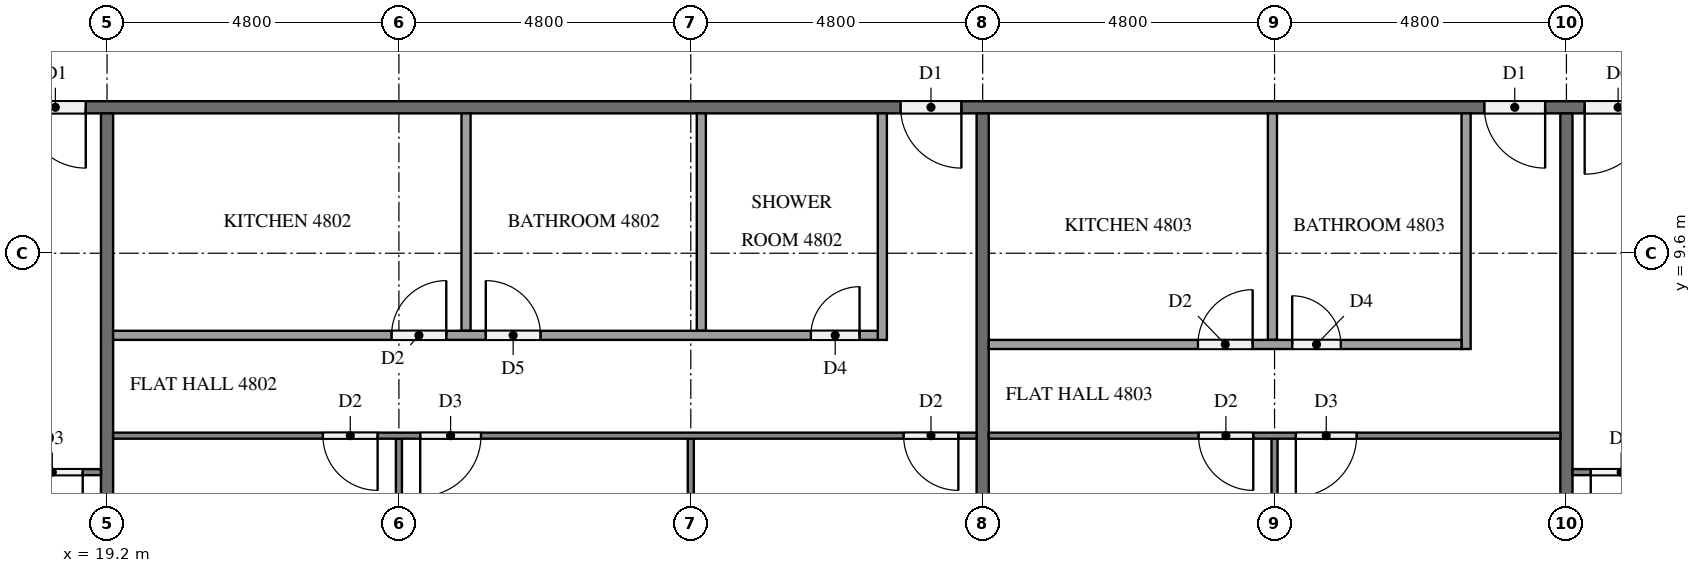
"""IFC4 building model, lengths in metres.
Left out: names, types, materials, properties, quantities, classifications, styles, units other than length and angle.
Written with IfcOpenShell. Run it as: python <this file> out.ifc"""

import sys

from ifc_helpers import new_model, si_unit, direction, frame, frame_2d, origin, place, context, subcontext, project, spatial, rectangle, extrude, element, fill, save


model = new_model("IFC4")
c1 = context("Model", 3, precision=1e-05, world=origin(), true_north=direction((0.0, 1.0)))
c2 = subcontext(c1, "Body", "Model", "MODEL_VIEW")
j1 = project(units=[si_unit("LENGTHUNIT", "METRE"), si_unit("PLANEANGLEUNIT", "RADIAN")], contexts=[c1])
p1 = place(None, origin())
s1 = spatial("IfcSite", under=j1, at=p1, CompositionType="ELEMENT")
p2 = place(p1, origin())
s2 = spatial("IfcBuilding", under=s1, at=p2, CompositionType="ELEMENT")
p3 = place(p2, frame((0.0, 0.0, 185.9)))
s3 = spatial("IfcBuildingStorey", under=s2, at=p3, CompositionType="ELEMENT", Elevation=185.9)
p4 = place(p3, frame((50.5, 12.0, 0.0), z_axis=(0.0, 0.0, 1.0), x_axis=(-1.0, 0.0, 0.0)))
e1 = element("IfcWall", 1, at=p4, inside=s3, PredefinedType="PARTITIONING", context=c2, shape_type="SweptSolid", body=[
    extrude(rectangle(XDim=38.6, YDim=0.2, at=frame_2d((19.3, 0.0))), origin(), (0.0, 0.0, 1.0), 3.2),
])
p5 = place(p4, frame((31.65, 0.0, 0.0)))
e2 = element("IfcOpeningElement", 2, at=p5, cuts=e1, PredefinedType="OPENING", context=c2, shape_type="SweptSolid", body=[
    extrude(rectangle(XDim=1.0, YDim=2.1, at=frame_2d((0.5, 1.05))), frame((0.0, 0.11, 0.0), z_axis=(0.0, -1.0, 0.0), x_axis=(1.0, 0.0, 0.0)), (0.0, 0.0, 1.0), 0.22),
])
p6 = place(p4, frame((17.25, 0.0, 0.0)))
e3 = element("IfcOpeningElement", 3, at=p6, cuts=e1, PredefinedType="OPENING", context=c2, shape_type="SweptSolid", body=[
    extrude(rectangle(XDim=1.0, YDim=2.1, at=frame_2d((0.5, 1.05))), frame((0.0, 0.11, 0.0), z_axis=(0.0, -1.0, 0.0), x_axis=(1.0, 0.0, 0.0)), (0.0, 0.0, 1.0), 0.22),
])
p7 = place(p4, frame((7.65, 0.0, 0.0)))
e4 = element("IfcOpeningElement", 4, at=p7, cuts=e1, PredefinedType="OPENING", context=c2, shape_type="SweptSolid", body=[
    extrude(rectangle(XDim=1.0, YDim=2.1, at=frame_2d((0.5, 1.05))), frame((0.0, 0.11, 0.0), z_axis=(0.0, -1.0, 0.0), x_axis=(1.0, 0.0, 0.0)), (0.0, 0.0, 1.0), 0.22),
])
p8 = place(p4, frame((5.9, 0.0, 0.0)))
e5 = element("IfcOpeningElement", 5, at=p8, cuts=e1, PredefinedType="OPENING", context=c2, shape_type="SweptSolid", body=[
    extrude(rectangle(XDim=1.1, YDim=2.1, at=frame_2d((0.55, 1.05))), frame((0.0, 0.11, 0.0), z_axis=(0.0, -1.0, 0.0), x_axis=(1.0, 0.0, 0.0)), (0.0, 0.0, 1.0), 0.22),
])
p9 = place(p3, frame((19.2, 11.9, 0.0), z_axis=(0.0, 0.0, 1.0), x_axis=(0.0, -1.0, 0.0)))
e6 = element("IfcWall", 6, at=p9, inside=s3, PredefinedType="PARTITIONING", context=c2, shape_type="SweptSolid", body=[
    extrude(rectangle(XDim=11.575, YDim=0.2, at=frame_2d((5.788, 0.0))), origin(), (0.0, 0.0, 1.0), 3.2),
])
for number, where, z_axis, x_axis in (
    (7, (33.6, 11.9, 0.0), (0.0, 0.0, 1.0), (0.0, -1.0, 0.0)),
    (8, (43.2, 11.9, 0.0), (0.0, 0.0, 1.0), (0.0, -1.0, 0.0)),
):
    element("IfcWall", number, at=place(p3, frame(where, z_axis=z_axis, x_axis=x_axis)), inside=s3, PredefinedType="PARTITIONING", context=c2, shape_type="SweptSolid", body=[
        extrude(rectangle(XDim=11.8, YDim=0.2, at=frame_2d((5.9, 0.0))), origin(), (0.0, 0.0, 1.0), 3.2),
    ])
p10 = place(p3, frame((19.1, 6.0, 0.0), z_axis=(0.0, 0.0, 1.0), x_axis=(-1.0, 0.0, 0.0)))
e9 = element("IfcWall", 9, at=p10, inside=s3, PredefinedType="PARTITIONING", context=c2, shape_type="SweptSolid", body=[
    extrude(rectangle(XDim=14.2, YDim=0.1, at=frame_2d((7.1, 0.0))), origin(), (0.0, 0.0, 1.0), 3.2),
])
p11 = place(p10, frame((0.3, 0.0, 0.0)))
e10 = element("IfcOpeningElement", 10, at=p11, cuts=e9, PredefinedType="OPENING", context=c2, shape_type="SweptSolid", body=[
    extrude(rectangle(XDim=1.0, YDim=2.1, at=frame_2d((0.5, 1.05))), frame((0.0, 0.06, 0.0), z_axis=(0.0, -1.0, 0.0), x_axis=(1.0, 0.0, 0.0)), (0.0, 0.0, 1.0), 0.12),
])
p12 = place(p10, frame((8.25, 0.0, 0.0)))
e11 = element("IfcOpeningElement", 11, at=p12, cuts=e9, PredefinedType="OPENING", context=c2, shape_type="SweptSolid", body=[
    extrude(rectangle(XDim=0.9, YDim=2.1, at=frame_2d((0.45, 1.05))), frame((0.0, 0.06, 0.0), z_axis=(0.0, -1.0, 0.0), x_axis=(1.0, 0.0, 0.0)), (0.0, 0.0, 1.0), 0.12),
])
p13 = place(p10, frame((9.85, 0.0, 0.0)))
e12 = element("IfcOpeningElement", 12, at=p13, cuts=e9, PredefinedType="OPENING", context=c2, shape_type="SweptSolid", body=[
    extrude(rectangle(XDim=0.9, YDim=2.1, at=frame_2d((0.45, 1.05))), frame((0.0, 0.06, 0.0), z_axis=(0.0, -1.0, 0.0), x_axis=(1.0, 0.0, 0.0)), (0.0, 0.0, 1.0), 0.12),
])
p14 = place(p3, frame((28.8, 6.55, 0.0), z_axis=(0.0, 0.0, 1.0), x_axis=(0.0, -1.0, 0.0)))
e13 = element("IfcWall", 13, at=p14, inside=s3, PredefinedType="PARTITIONING", context=c2, shape_type="SweptSolid", body=[
    extrude(rectangle(XDim=6.225, YDim=0.1, at=frame_2d((3.113, 0.0))), origin(), (0.0, 0.0, 1.0), 3.2),
])
p15 = place(p3, frame((24.0, 6.55, 0.0), z_axis=(0.0, 0.0, 1.0), x_axis=(0.0, -1.0, 0.0)))
e14 = element("IfcWall", 14, at=p15, inside=s3, PredefinedType="PARTITIONING", context=c2, shape_type="SweptSolid", body=[
    extrude(rectangle(XDim=6.45, YDim=0.1, at=frame_2d((3.225, 0.0))), origin(), (0.0, 0.0, 1.0), 3.2),
])
p16 = place(p3, frame((33.5, 6.6, 0.0), z_axis=(0.0, 0.0, 1.0), x_axis=(-1.0, 0.0, 0.0)))
e15 = element("IfcWall", 15, at=p16, inside=s3, PredefinedType="PARTITIONING", context=c2, shape_type="SweptSolid", body=[
    extrude(rectangle(XDim=14.2, YDim=0.1, at=frame_2d((7.1, 0.0))), origin(), (0.0, 0.0, 1.0), 3.2),
])
p17 = place(p16, frame((0.3, 0.0, 0.0)))
e16 = element("IfcOpeningElement", 16, at=p17, cuts=e15, PredefinedType="OPENING", context=c2, shape_type="SweptSolid", body=[
    extrude(rectangle(XDim=0.9, YDim=2.1, at=frame_2d((0.45, 1.05))), frame((0.0, 0.06, 0.0), z_axis=(0.0, -1.0, 0.0), x_axis=(1.0, 0.0, 0.0)), (0.0, 0.0, 1.0), 0.12),
])
p18 = place(p16, frame((8.15, 0.0, 0.0)))
e17 = element("IfcOpeningElement", 17, at=p18, cuts=e15, PredefinedType="OPENING", context=c2, shape_type="SweptSolid", body=[
    extrude(rectangle(XDim=1.0, YDim=2.1, at=frame_2d((0.5, 1.05))), frame((0.0, 0.06, 0.0), z_axis=(0.0, -1.0, 0.0), x_axis=(1.0, 0.0, 0.0)), (0.0, 0.0, 1.0), 0.12),
])
p19 = place(p16, frame((9.85, 0.0, 0.0)))
e18 = element("IfcOpeningElement", 18, at=p19, cuts=e15, PredefinedType="OPENING", context=c2, shape_type="SweptSolid", body=[
    extrude(rectangle(XDim=0.9, YDim=2.1, at=frame_2d((0.45, 1.05))), frame((0.0, 0.06, 0.0), z_axis=(0.0, -1.0, 0.0), x_axis=(1.0, 0.0, 0.0)), (0.0, 0.0, 1.0), 0.12),
])
for number, where, z_axis, x_axis in (
    (19, (28.973, 11.9, 0.0), (0.0, 0.0, 1.0), (0.0, -1.0, 0.0)),
    (20, (25.104, 11.9, 0.0), (0.0, 0.0, 1.0), (0.0, -1.0, 0.0)),
):
    element("IfcWall", number, at=place(p3, frame(where, z_axis=z_axis, x_axis=x_axis)), inside=s3, PredefinedType="PARTITIONING", context=c2, shape_type="SweptSolid", body=[
        extrude(rectangle(XDim=3.575, YDim=0.15, at=frame_2d((1.788, 0.0))), origin(), (0.0, 0.0, 1.0), 3.2),
    ])
p20 = place(p3, frame((31.95, 11.9, 0.0), z_axis=(0.0, 0.0, 1.0), x_axis=(0.0, -1.0, 0.0)))
e21 = element("IfcWall", 21, at=p20, inside=s3, PredefinedType="PARTITIONING", context=c2, shape_type="SweptSolid", body=[
    extrude(rectangle(XDim=3.725, YDim=0.15, at=frame_2d((1.862, 0.0))), origin(), (0.0, 0.0, 1.0), 3.2),
])
p21 = place(p3, frame((19.3, 8.25, 0.0), z_axis=(0.0, 0.0, 1.0), x_axis=(1.0, 0.0, 0.0)))
e22 = element("IfcWall", 22, at=p21, inside=s3, PredefinedType="PARTITIONING", context=c2, shape_type="SweptSolid", body=[
    extrude(rectangle(XDim=12.575, YDim=0.15, at=frame_2d((6.288, 0.0))), origin(), (0.0, 0.0, 1.0), 3.2),
])
p22 = place(p21, frame((11.475, 0.0, 0.0)))
e23 = element("IfcOpeningElement", 23, at=p22, cuts=e22, PredefinedType="OPENING", context=c2, shape_type="SweptSolid", body=[
    extrude(rectangle(XDim=0.8, YDim=2.1, at=frame_2d((0.4, 1.05))), frame((0.0, 0.085, 0.0), z_axis=(0.0, -1.0, 0.0), x_axis=(1.0, 0.0, 0.0)), (0.0, 0.0, 1.0), 0.17),
])
p23 = place(p21, frame((6.129, 0.0, 0.0)))
e24 = element("IfcOpeningElement", 24, at=p23, cuts=e22, PredefinedType="OPENING", context=c2, shape_type="SweptSolid", body=[
    extrude(rectangle(XDim=0.9, YDim=2.1, at=frame_2d((0.45, 1.05))), frame((0.0, 0.085, 0.0), z_axis=(0.0, -1.0, 0.0), x_axis=(1.0, 0.0, 0.0)), (0.0, 0.0, 1.0), 0.17),
])
p24 = place(p21, frame((4.579, 0.0, 0.0)))
e25 = element("IfcOpeningElement", 25, at=p24, cuts=e22, PredefinedType="OPENING", context=c2, shape_type="SweptSolid", body=[
    extrude(rectangle(XDim=0.9, YDim=2.1, at=frame_2d((0.45, 1.05))), frame((0.0, 0.085, 0.0), z_axis=(0.0, -1.0, 0.0), x_axis=(1.0, 0.0, 0.0)), (0.0, 0.0, 1.0), 0.17),
])
p25 = place(p3, frame((38.4, 6.55, 0.0), z_axis=(0.0, 0.0, 1.0), x_axis=(0.0, -1.0, 0.0)))
e26 = element("IfcWall", 26, at=p25, inside=s3, PredefinedType="PARTITIONING", context=c2, shape_type="SweptSolid", body=[
    extrude(rectangle(XDim=6.225, YDim=0.1, at=frame_2d((3.113, 0.0))), origin(), (0.0, 0.0, 1.0), 3.2),
])
p26 = place(p3, frame((43.1, 6.6, 0.0), z_axis=(0.0, 0.0, 1.0), x_axis=(-1.0, 0.0, 0.0)))
e27 = element("IfcWall", 27, at=p26, inside=s3, PredefinedType="PARTITIONING", context=c2, shape_type="SweptSolid", body=[
    extrude(rectangle(XDim=9.4, YDim=0.1, at=frame_2d((4.7, 0.0))), origin(), (0.0, 0.0, 1.0), 3.2),
])
p27 = place(p26, frame((3.35, 0.0, 0.0)))
e28 = element("IfcOpeningElement", 28, at=p27, cuts=e27, PredefinedType="OPENING", context=c2, shape_type="SweptSolid", body=[
    extrude(rectangle(XDim=1.0, YDim=2.1, at=frame_2d((0.5, 1.05))), frame((0.0, 0.06, 0.0), z_axis=(0.0, -1.0, 0.0), x_axis=(1.0, 0.0, 0.0)), (0.0, 0.0, 1.0), 0.12),
])
p28 = place(p26, frame((5.05, 0.0, 0.0)))
e29 = element("IfcOpeningElement", 29, at=p28, cuts=e27, PredefinedType="OPENING", context=c2, shape_type="SweptSolid", body=[
    extrude(rectangle(XDim=0.9, YDim=2.1, at=frame_2d((0.45, 1.05))), frame((0.0, 0.06, 0.0), z_axis=(0.0, -1.0, 0.0), x_axis=(1.0, 0.0, 0.0)), (0.0, 0.0, 1.0), 0.12),
])
p29 = place(p3, frame((38.365, 11.9, 0.0), z_axis=(0.0, 0.0, 1.0), x_axis=(0.0, -1.0, 0.0)))
e30 = element("IfcWall", 30, at=p29, inside=s3, PredefinedType="PARTITIONING", context=c2, shape_type="SweptSolid", body=[
    extrude(rectangle(XDim=3.725, YDim=0.15, at=frame_2d((1.862, 0.0))), origin(), (0.0, 0.0, 1.0), 3.2),
])
p30 = place(p3, frame((41.55, 11.9, 0.0), z_axis=(0.0, 0.0, 1.0), x_axis=(0.0, -1.0, 0.0)))
e31 = element("IfcWall", 31, at=p30, inside=s3, PredefinedType="PARTITIONING", context=c2, shape_type="SweptSolid", body=[
    extrude(rectangle(XDim=3.875, YDim=0.15, at=frame_2d((1.938, 0.0))), origin(), (0.0, 0.0, 1.0), 3.2),
])
p31 = place(p3, frame((33.7, 8.1, 0.0), z_axis=(0.0, 0.0, 1.0), x_axis=(1.0, 0.0, 0.0)))
e32 = element("IfcWall", 32, at=p31, inside=s3, PredefinedType="PARTITIONING", context=c2, shape_type="SweptSolid", body=[
    extrude(rectangle(XDim=7.775, YDim=0.15, at=frame_2d((3.888, 0.0))), origin(), (0.0, 0.0, 1.0), 3.2),
])
p32 = place(p31, frame((4.99, 0.0, 0.0)))
e33 = element("IfcOpeningElement", 33, at=p32, cuts=e32, PredefinedType="OPENING", context=c2, shape_type="SweptSolid", body=[
    extrude(rectangle(XDim=0.8, YDim=2.1, at=frame_2d((0.4, 1.05))), frame((0.0, 0.085, 0.0), z_axis=(0.0, -1.0, 0.0), x_axis=(1.0, 0.0, 0.0)), (0.0, 0.0, 1.0), 0.17),
])
p33 = place(p31, frame((3.44, 0.0, 0.0)))
e34 = element("IfcOpeningElement", 34, at=p33, cuts=e32, PredefinedType="OPENING", context=c2, shape_type="SweptSolid", body=[
    extrude(rectangle(XDim=0.9, YDim=2.1, at=frame_2d((0.45, 1.05))), frame((0.0, 0.085, 0.0), z_axis=(0.0, -1.0, 0.0), x_axis=(1.0, 0.0, 0.0)), (0.0, 0.0, 1.0), 0.17),
])
p34 = place(p3, frame((62.3, 6.0, 0.0), z_axis=(0.0, 0.0, 1.0), x_axis=(-1.0, 0.0, 0.0)))
e35 = element("IfcWall", 35, at=p34, inside=s3, PredefinedType="PARTITIONING", context=c2, shape_type="SweptSolid", body=[
    extrude(rectangle(XDim=19.0, YDim=0.1, at=frame_2d((9.5, 0.0))), origin(), (0.0, 0.0, 1.0), 3.2),
])
p35 = place(p34, frame((17.7, 0.0, 0.0)))
e36 = element("IfcOpeningElement", 36, at=p35, cuts=e35, PredefinedType="OPENING", context=c2, shape_type="SweptSolid", body=[
    extrude(rectangle(XDim=1.0, YDim=2.1, at=frame_2d((0.5, 1.05))), frame((0.0, 0.06, 0.0), z_axis=(0.0, -1.0, 0.0), x_axis=(1.0, 0.0, 0.0)), (0.0, 0.0, 1.0), 0.12),
])
p36 = place(p34, frame((9.85, 0.0, 0.0)))
e37 = element("IfcOpeningElement", 37, at=p36, cuts=e35, PredefinedType="OPENING", context=c2, shape_type="SweptSolid", body=[
    extrude(rectangle(XDim=0.9, YDim=2.1, at=frame_2d((0.45, 1.05))), frame((0.0, 0.06, 0.0), z_axis=(0.0, -1.0, 0.0), x_axis=(1.0, 0.0, 0.0)), (0.0, 0.0, 1.0), 0.12),
])
p37 = place(p34, frame((8.25, 0.0, 0.0)))
e38 = element("IfcOpeningElement", 38, at=p37, cuts=e35, PredefinedType="OPENING", context=c2, shape_type="SweptSolid", body=[
    extrude(rectangle(XDim=0.9, YDim=2.1, at=frame_2d((0.45, 1.05))), frame((0.0, 0.06, 0.0), z_axis=(0.0, -1.0, 0.0), x_axis=(1.0, 0.0, 0.0)), (0.0, 0.0, 1.0), 0.12),
])
p38 = place(p34, frame((0.4, 0.0, 0.0)))
e39 = element("IfcOpeningElement", 39, at=p38, cuts=e35, PredefinedType="OPENING", context=c2, shape_type="SweptSolid", body=[
    extrude(rectangle(XDim=0.9, YDim=2.1, at=frame_2d((0.45, 1.05))), frame((0.0, 0.06, 0.0), z_axis=(0.0, -1.0, 0.0), x_axis=(1.0, 0.0, 0.0)), (0.0, 0.0, 1.0), 0.12),
])
p39 = place(p5, origin())
e40 = element("IfcDoor", 40, at=p39, inside=s3, OperationType="SINGLE_SWING_LEFT", PredefinedType="DOOR", context=c2, shape_type="SweptSolid", body=[
    extrude(rectangle(XDim=1.0, YDim=2.1, at=frame_2d((0.5, 1.05))), frame((0.0, 0.025, 0.0), z_axis=(0.0, -1.0, 0.0), x_axis=(1.0, 0.0, 0.0)), (0.0, 0.0, 1.0), 0.05),
])
fill(e2, e40)
p40 = place(p6, origin())
e41 = element("IfcDoor", 41, at=p40, inside=s3, OperationType="SINGLE_SWING_LEFT", PredefinedType="DOOR", context=c2, shape_type="SweptSolid", body=[
    extrude(rectangle(XDim=1.0, YDim=2.1, at=frame_2d((0.5, 1.05))), frame((0.0, 0.025, 0.0), z_axis=(0.0, -1.0, 0.0), x_axis=(1.0, 0.0, 0.0)), (0.0, 0.0, 1.0), 0.05),
])
fill(e3, e41)
p41 = place(p7, origin())
e42 = element("IfcDoor", 42, at=p41, inside=s3, OperationType="SINGLE_SWING_LEFT", PredefinedType="DOOR", context=c2, shape_type="SweptSolid", body=[
    extrude(rectangle(XDim=1.0, YDim=2.1, at=frame_2d((0.5, 1.05))), frame((0.0, 0.025, 0.0), z_axis=(0.0, -1.0, 0.0), x_axis=(1.0, 0.0, 0.0)), (0.0, 0.0, 1.0), 0.05),
])
fill(e4, e42)
p42 = place(p8, origin())
e43 = element("IfcDoor", 43, at=p42, inside=s3, OperationType="SINGLE_SWING_RIGHT", PredefinedType="DOOR", context=c2, shape_type="SweptSolid", body=[
    extrude(rectangle(XDim=1.1, YDim=2.1, at=frame_2d((0.55, 1.05))), frame((0.0, 0.025, 0.0), z_axis=(0.0, -1.0, 0.0), x_axis=(1.0, 0.0, 0.0)), (0.0, 0.0, 1.0), 0.05),
])
fill(e5, e43)
p43 = place(p11, origin())
e44 = element("IfcDoor", 44, at=p43, inside=s3, OperationType="SINGLE_SWING_LEFT", PredefinedType="DOOR", context=c2, shape_type="SweptSolid", body=[
    extrude(rectangle(XDim=1.0, YDim=2.1, at=frame_2d((0.5, 1.05))), frame((0.0, 0.025, 0.0), z_axis=(0.0, -1.0, 0.0), x_axis=(1.0, 0.0, 0.0)), (0.0, 0.0, 1.0), 0.05),
])
fill(e10, e44)
p44 = place(p17, origin())
e45 = element("IfcDoor", 45, at=p44, inside=s3, OperationType="SINGLE_SWING_LEFT", PredefinedType="DOOR", context=c2, shape_type="SweptSolid", body=[
    extrude(rectangle(XDim=0.9, YDim=2.1, at=frame_2d((0.45, 1.05))), frame((0.0, 0.025, 0.0), z_axis=(0.0, -1.0, 0.0), x_axis=(1.0, 0.0, 0.0)), (0.0, 0.0, 1.0), 0.05),
])
fill(e16, e45)
p45 = place(p18, origin())
e46 = element("IfcDoor", 46, at=p45, inside=s3, OperationType="SINGLE_SWING_RIGHT", PredefinedType="DOOR", context=c2, shape_type="SweptSolid", body=[
    extrude(rectangle(XDim=1.0, YDim=2.1, at=frame_2d((0.5, 1.05))), frame((0.0, 0.025, 0.0), z_axis=(0.0, -1.0, 0.0), x_axis=(1.0, 0.0, 0.0)), (0.0, 0.0, 1.0), 0.05),
])
fill(e17, e46)
p46 = place(p19, origin())
e47 = element("IfcDoor", 47, at=p46, inside=s3, OperationType="SINGLE_SWING_LEFT", PredefinedType="DOOR", context=c2, shape_type="SweptSolid", body=[
    extrude(rectangle(XDim=0.9, YDim=2.1, at=frame_2d((0.45, 1.05))), frame((0.0, 0.025, 0.0), z_axis=(0.0, -1.0, 0.0), x_axis=(1.0, 0.0, 0.0)), (0.0, 0.0, 1.0), 0.05),
])
fill(e18, e47)
p47 = place(p22, origin())
e48 = element("IfcDoor", 48, at=p47, inside=s3, OperationType="SINGLE_SWING_RIGHT", PredefinedType="DOOR", context=c2, shape_type="SweptSolid", body=[
    extrude(rectangle(XDim=0.8, YDim=2.1, at=frame_2d((0.4, 1.05))), frame((0.0, 0.025, 0.0), z_axis=(0.0, -1.0, 0.0), x_axis=(1.0, 0.0, 0.0)), (0.0, 0.0, 1.0), 0.05),
])
fill(e23, e48)
p48 = place(p23, origin())
e49 = element("IfcDoor", 49, at=p48, inside=s3, OperationType="SINGLE_SWING_LEFT", PredefinedType="DOOR", context=c2, shape_type="SweptSolid", body=[
    extrude(rectangle(XDim=0.9, YDim=2.1, at=frame_2d((0.45, 1.05))), frame((0.0, 0.025, 0.0), z_axis=(0.0, -1.0, 0.0), x_axis=(1.0, 0.0, 0.0)), (0.0, 0.0, 1.0), 0.05),
])
fill(e24, e49)
p49 = place(p24, origin())
e50 = element("IfcDoor", 50, at=p49, inside=s3, OperationType="SINGLE_SWING_RIGHT", PredefinedType="DOOR", context=c2, shape_type="SweptSolid", body=[
    extrude(rectangle(XDim=0.9, YDim=2.1, at=frame_2d((0.45, 1.05))), frame((0.0, 0.025, 0.0), z_axis=(0.0, -1.0, 0.0), x_axis=(1.0, 0.0, 0.0)), (0.0, 0.0, 1.0), 0.05),
])
fill(e25, e50)
p50 = place(p27, origin())
e51 = element("IfcDoor", 51, at=p50, inside=s3, OperationType="SINGLE_SWING_RIGHT", PredefinedType="DOOR", context=c2, shape_type="SweptSolid", body=[
    extrude(rectangle(XDim=1.0, YDim=2.1, at=frame_2d((0.5, 1.05))), frame((0.0, 0.025, 0.0), z_axis=(0.0, -1.0, 0.0), x_axis=(1.0, 0.0, 0.0)), (0.0, 0.0, 1.0), 0.05),
])
fill(e28, e51)
p51 = place(p28, origin())
e52 = element("IfcDoor", 52, at=p51, inside=s3, OperationType="SINGLE_SWING_LEFT", PredefinedType="DOOR", context=c2, shape_type="SweptSolid", body=[
    extrude(rectangle(XDim=0.9, YDim=2.1, at=frame_2d((0.45, 1.05))), frame((0.0, 0.025, 0.0), z_axis=(0.0, -1.0, 0.0), x_axis=(1.0, 0.0, 0.0)), (0.0, 0.0, 1.0), 0.05),
])
fill(e29, e52)
p52 = place(p32, origin())
e53 = element("IfcDoor", 53, at=p52, inside=s3, OperationType="SINGLE_SWING_LEFT", PredefinedType="DOOR", context=c2, shape_type="SweptSolid", body=[
    extrude(rectangle(XDim=0.8, YDim=2.1, at=frame_2d((0.4, 1.05))), frame((0.0, 0.025, 0.0), z_axis=(0.0, -1.0, 0.0), x_axis=(1.0, 0.0, 0.0)), (0.0, 0.0, 1.0), 0.05),
])
fill(e33, e53)
p53 = place(p33, origin())
e54 = element("IfcDoor", 54, at=p53, inside=s3, OperationType="SINGLE_SWING_RIGHT", PredefinedType="DOOR", context=c2, shape_type="SweptSolid", body=[
    extrude(rectangle(XDim=0.9, YDim=2.1, at=frame_2d((0.45, 1.05))), frame((0.0, 0.025, 0.0), z_axis=(0.0, -1.0, 0.0), x_axis=(1.0, 0.0, 0.0)), (0.0, 0.0, 1.0), 0.05),
])
fill(e34, e54)
p54 = place(p35, origin())
e55 = element("IfcDoor", 55, at=p54, inside=s3, OperationType="SINGLE_SWING_RIGHT", PredefinedType="DOOR", context=c2, shape_type="SweptSolid", body=[
    extrude(rectangle(XDim=1.0, YDim=2.1, at=frame_2d((0.5, 1.05))), frame((0.0, 0.025, 0.0), z_axis=(0.0, -1.0, 0.0), x_axis=(1.0, 0.0, 0.0)), (0.0, 0.0, 1.0), 0.05),
])
fill(e36, e55)
save(model, sys.argv[1])
